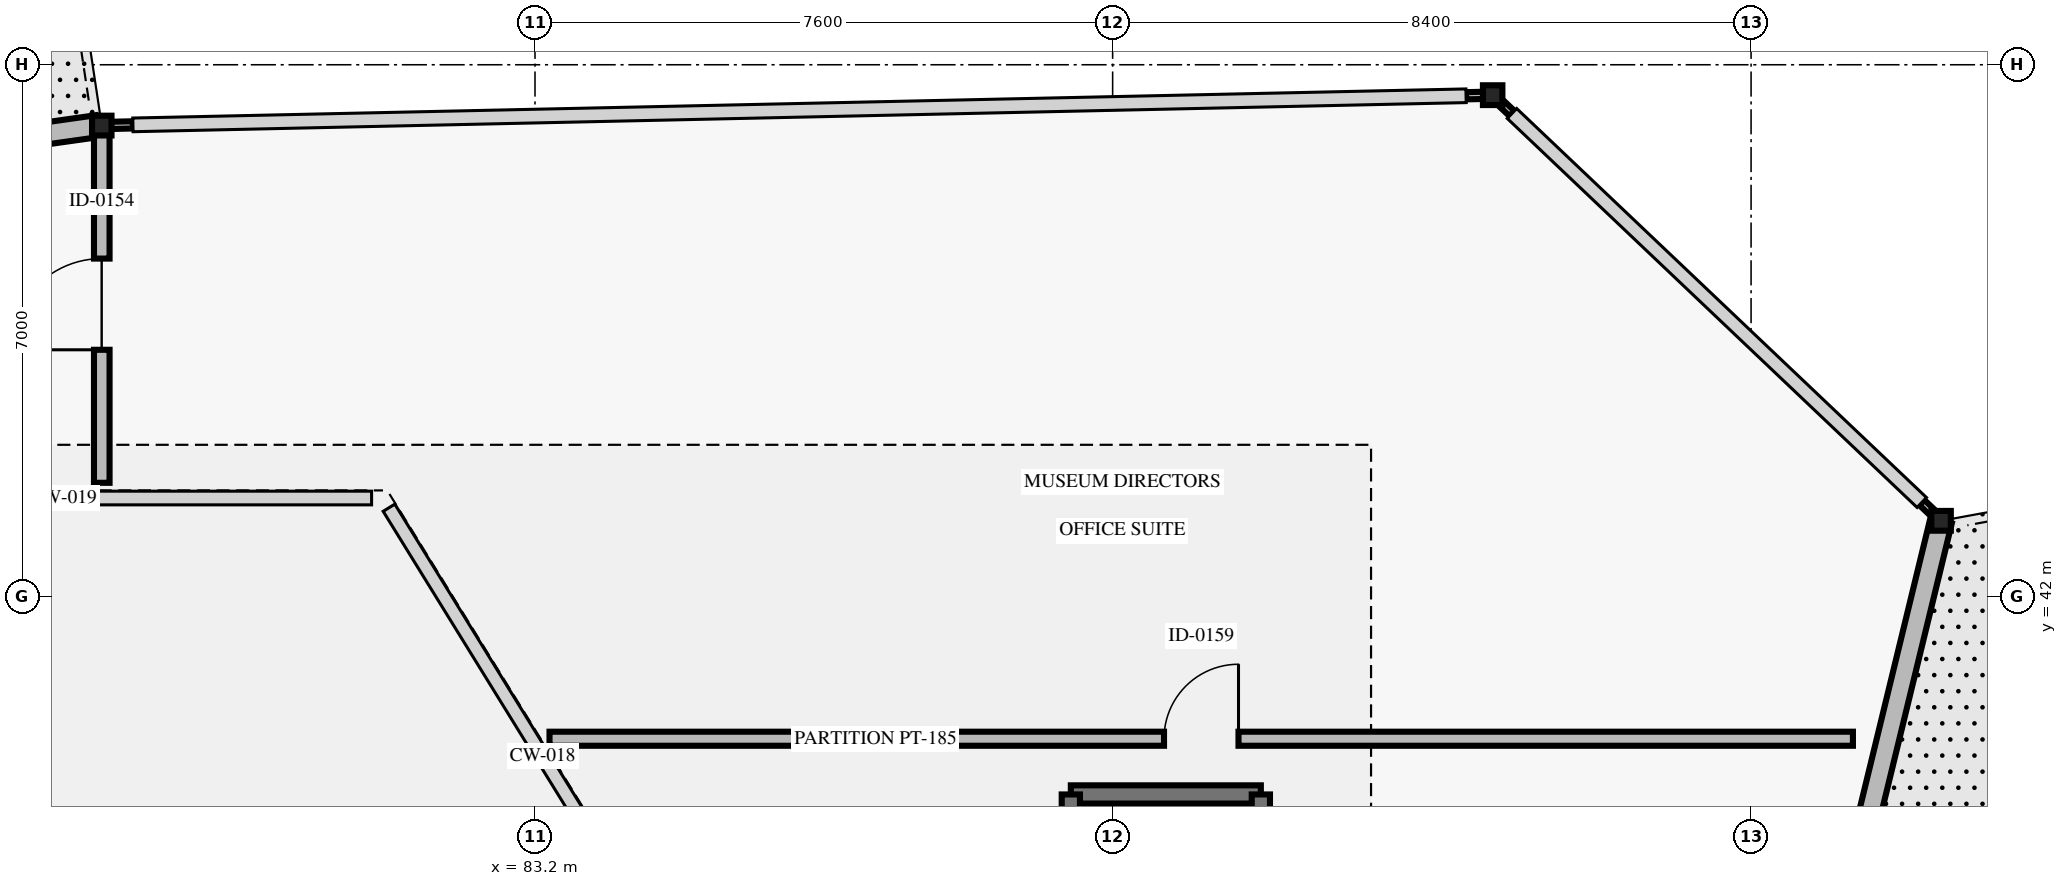
"""IFC4 building model, lengths in metres.
Left out: names, types, materials, properties, quantities, classifications, styles, units other than length and angle.
Written with IfcOpenShell. Run it as: python <this file> out.ifc"""

import sys

from ifc_helpers import new_model, si_unit, direction, frame, frame_2d, origin, origin_2d, place, context, subcontext, project, spatial, rectangle, i_section, extrude, element, fill, save


model = new_model("IFC4")
c1 = context("Model", 3, precision=1e-05, world=origin(), true_north=direction((0.0, 1.0)))
c2 = subcontext(c1, "Body", "Model", "MODEL_VIEW")
j1 = project(units=[si_unit("LENGTHUNIT", "METRE"), si_unit("PLANEANGLEUNIT", "RADIAN")], contexts=[c1])
p1 = place(None, origin())
s1 = spatial("IfcSite", under=j1, at=p1, CompositionType="ELEMENT")
p2 = place(p1, origin())
s2 = spatial("IfcBuilding", under=s1, at=p2, CompositionType="ELEMENT")
p3 = place(p2, frame((0.0, 0.0, 19.8)))
s3 = spatial("IfcBuildingStorey", under=s2, at=p3, CompositionType="ELEMENT", Elevation=19.8)
for number, where, z_axis, x_axis in (
    (1, (77.5, 48.2, 0.0), (0.0, 0.0, 1.0), (1.0, 0.0, 0.0)),
    (2, (95.8, 48.6, 0.0), (0.0, 0.0, 1.0), (1.0, 0.0, 0.0)),
    (3, (101.7, 43.0, 0.0), (0.0, 0.0, 1.0), (1.0, 0.0, 0.0)),
):
    element("IfcColumn", number, at=place(p3, frame(where, z_axis=z_axis, x_axis=x_axis)), inside=s3, PredefinedType="COLUMN", context=c2, shape_type="SweptSolid", body=[
        extrude(i_section(OverallWidth=0.256, OverallDepth=0.26, WebThickness=0.01, FlangeThickness=0.017, FilletRadius=0.013, at=origin_2d()), origin(), (0.0, 0.0, 1.0), 9.0),
    ])
p4 = place(p3, frame((52.0, 44.6, 0.0), z_axis=(0.0, 0.0, 1.0), x_axis=(0.990179648472, 0.139800800256, 0.0)))
e4 = element("IfcWall", 4, at=p4, inside=s3, PredefinedType="SOLIDWALL", context=c2, shape_type="SweptSolid", body=[
    extrude(rectangle(XDim=25.692, YDim=0.29, at=frame_2d((12.846, 0.0))), origin(), (0.0, 0.0, 1.0), 7.82),
])
p5 = place(p4, frame((18.415, 0.0, 0.0)))
e5 = element("IfcOpeningElement", 5, at=p5, cuts=e4, PredefinedType="OPENING", context=c2, shape_type="SweptSolid", body=[
    extrude(rectangle(XDim=1.8, YDim=2.25, at=frame_2d((0.9, 1.125))), frame((0.0, 0.155, 0.0), z_axis=(0.0, -1.0, 0.0), x_axis=(1.0, 0.0, 0.0)), (0.0, 0.0, 1.0), 0.31),
])
p6 = place(p3, frame((101.7, 43.0, 0.0), z_axis=(0.0, 0.0, 1.0), x_axis=(-0.236341762997, -0.971669990822, 0.0)))
e6 = element("IfcWall", 6, at=p6, inside=s3, PredefinedType="SOLIDWALL", context=c2, shape_type="SweptSolid", body=[
    extrude(rectangle(XDim=15.231, YDim=0.29, at=frame_2d((7.616, 0.0))), origin(), (0.0, 0.0, 1.0), 7.82),
])
p7 = place(p6, frame((6.716, 0.0, 0.0)))
e7 = element("IfcOpeningElement", 7, at=p7, cuts=e6, PredefinedType="OPENING", context=c2, shape_type="SweptSolid", body=[
    extrude(rectangle(XDim=1.8, YDim=2.25, at=frame_2d((0.9, 1.125))), frame((0.0, 0.155, 0.0), z_axis=(0.0, -1.0, 0.0), x_axis=(1.0, 0.0, 0.0)), (0.0, 0.0, 1.0), 0.31),
])
for number, where, z_axis, x_axis in (
    (8, (95.83, 48.571, 0.0), (0.0, 0.0, 1.0), (0.726, -0.688, 0.0)),
    (9, (101.446, 43.241, 0.0), (0.0, 0.0, 1.0), (0.726, -0.687, 0.0)),
):
    element("IfcWall", number, at=place(p3, frame(where, z_axis=z_axis, x_axis=x_axis)), inside=s3, PredefinedType="SOLIDWALL", context=c2, shape_type="SweptSolid", body=[
        extrude(rectangle(XDim=0.308, YDim=0.095, at=frame_2d((0.154, 0.0))), origin(), (0.0, 0.0, 1.0), 7.82),
    ])
p8 = place(p3, frame((77.602, 48.202, 0.0), z_axis=(0.0, 0.0, 1.0), x_axis=(0.999735659566, 0.022991541735, 0.0)))
e10 = element("IfcWall", 10, at=p8, inside=s3, PredefinedType="SOLIDWALL", context=c2, shape_type="SweptSolid", body=[
    extrude(rectangle(XDim=0.308, YDim=0.095, at=frame_2d((0.154, 0.0))), origin(), (0.0, 0.0, 1.0), 7.82),
])
p9 = place(p3, frame((95.45, 48.592, 0.0), z_axis=(0.0, 0.0, 1.0), x_axis=(0.999736078158, 0.022973333016, 0.0)))
e11 = element("IfcWall", 11, at=p9, inside=s3, PredefinedType="SOLIDWALL", context=c2, shape_type="SweptSolid", body=[
    extrude(rectangle(XDim=0.308, YDim=0.095, at=frame_2d((0.154, 0.0))), origin(), (0.0, 0.0, 1.0), 7.82),
])
p10 = place(p3, frame((77.5, 43.5, 0.0), z_axis=(0.0, 0.0, 1.0), x_axis=(0.0, 1.0, 0.0)))
e12 = element("IfcWall", 12, at=p10, inside=s3, PredefinedType="SOLIDWALL", context=c2, shape_type="SweptSolid", body=[
    extrude(rectangle(XDim=4.7, YDim=0.205, at=frame_2d((2.35, 0.0))), origin(), (0.0, 0.0, 1.0), 7.52),
])
p11 = place(p10, frame((1.75, 0.0, 0.0)))
e13 = element("IfcOpeningElement", 13, at=p11, cuts=e12, PredefinedType="OPENING", context=c2, shape_type="SweptSolid", body=[
    extrude(rectangle(XDim=1.2, YDim=2.2, at=frame_2d((0.6, 1.1))), frame((0.0, 0.113, 0.0), z_axis=(0.0, -1.0, 0.0), x_axis=(1.0, 0.0, 0.0)), (0.0, 0.0, 1.0), 0.225),
])
p12 = place(p3, frame((83.391, 40.133, 0.0), z_axis=(0.0, 0.0, 1.0), x_axis=(1.0, 0.0, 0.0)))
e14 = element("IfcWall", 14, at=p12, inside=s3, PredefinedType="PARTITIONING", context=c2, shape_type="SweptSolid", body=[
    extrude(rectangle(XDim=17.149, YDim=0.185, at=frame_2d((8.574, 0.0))), origin(), (0.0, 0.0, 1.0), 7.52),
])
p13 = place(p12, frame((8.085, 0.0, 0.0)))
e15 = element("IfcOpeningElement", 15, at=p13, cuts=e14, PredefinedType="OPENING", context=c2, shape_type="SweptSolid", body=[
    extrude(rectangle(XDim=0.98, YDim=2.15, at=frame_2d((0.49, 1.075))), frame((0.0, 0.103, 0.0), z_axis=(0.0, -1.0, 0.0), x_axis=(1.0, 0.0, 0.0)), (0.0, 0.0, 1.0), 0.205),
])
p14 = place(p3, frame((90.25, 39.4, 0.0), z_axis=(0.0, 0.0, 1.0), x_axis=(1.0, 0.0, 0.0)))
e16 = element("IfcWall", 16, at=p14, inside=s3, PredefinedType="SHEAR", context=c2, shape_type="SweptSolid", body=[
    extrude(rectangle(XDim=2.5, YDim=0.24, at=frame_2d((1.25, 0.0))), origin(), (0.0, 0.0, 1.0), 10.1),
])
for number, where, z_axis, x_axis in (
    (17, (92.75, 39.4, 0.0), (0.0, 0.0, 1.0), (0.0, -1.0, 0.0)),
    (18, (90.25, 36.6, 0.0), (0.0, 0.0, 1.0), (0.0, 1.0, 0.0)),
):
    element("IfcWall", number, at=place(p3, frame(where, z_axis=z_axis, x_axis=x_axis)), inside=s3, PredefinedType="SHEAR", context=c2, shape_type="SweptSolid", body=[
        extrude(rectangle(XDim=2.8, YDim=0.24, at=frame_2d((1.4, 0.0))), origin(), (0.0, 0.0, 1.0), 10.1),
    ])
p15 = place(p11, origin())
e19 = element("IfcDoor", 19, at=p15, inside=s3, OperationType="SINGLE_SWING_LEFT", PredefinedType="DOOR", context=c2, shape_type="SweptSolid", body=[
    extrude(rectangle(XDim=1.2, YDim=2.2, at=frame_2d((0.6, 1.1))), frame((0.0, 0.025, 0.0), z_axis=(0.0, -1.0, 0.0), x_axis=(1.0, 0.0, 0.0)), (0.0, 0.0, 1.0), 0.05),
])
fill(e13, e19)
p16 = place(p13, origin())
e20 = element("IfcDoor", 20, at=p16, inside=s3, OperationType="SINGLE_SWING_RIGHT", PredefinedType="DOOR", context=c2, shape_type="SweptSolid", body=[
    extrude(rectangle(XDim=0.98, YDim=2.15, at=frame_2d((0.49, 1.075))), frame((0.0, 0.025, 0.0), z_axis=(0.0, -1.0, 0.0), x_axis=(1.0, 0.0, 0.0)), (0.0, 0.0, 1.0), 0.05),
])
fill(e15, e20)
save(model, sys.argv[1])
